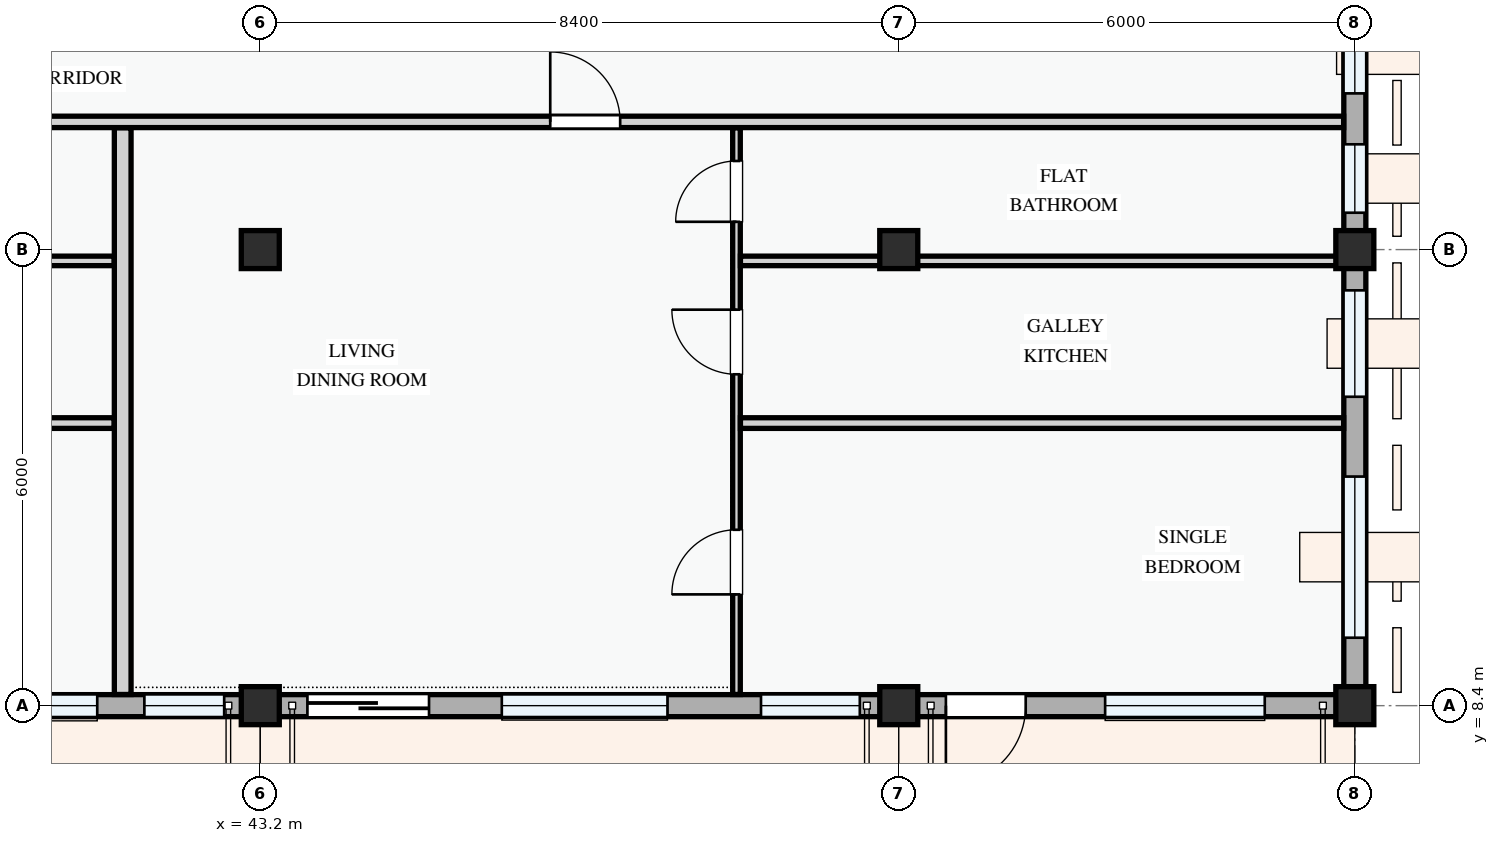
"""IFC4 building model, lengths in metres.
Left out: names, types, materials, properties, quantities, classifications, styles, units other than length and angle.
Written with IfcOpenShell. Run it as: python <this file> out.ifc"""

import sys

from ifc_helpers import new_model, si_unit, direction, frame, frame_2d, origin, origin_2d, place, context, subcontext, project, spatial, rectangle, extrude, element, fill, save


model = new_model("IFC4")
c1 = context("Model", 3, precision=1e-05, world=origin(), true_north=direction((0.0, 1.0)))
c2 = subcontext(c1, "Body", "Model", "MODEL_VIEW")
j1 = project(units=[si_unit("LENGTHUNIT", "METRE"), si_unit("PLANEANGLEUNIT", "RADIAN")], contexts=[c1])
p1 = place(None, origin())
s1 = spatial("IfcSite", under=j1, at=p1, CompositionType="ELEMENT")
p2 = place(p1, origin())
s2 = spatial("IfcBuilding", under=s1, at=p2, CompositionType="ELEMENT")
p3 = place(p2, frame((0.0, 0.0, 21.3)))
s3 = spatial("IfcBuildingStorey", under=s2, at=p3, CompositionType="ELEMENT", Elevation=21.3)
for number, where, z_axis, x_axis in (
    (1, (43.2, 8.4, 0.0), (0.0, 0.0, 1.0), (1.0, 0.0, 0.0)),
    (2, (43.2, 14.4, 0.0), (0.0, 0.0, 1.0), (1.0, 0.0, 0.0)),
    (3, (51.6, 8.4, 0.0), (0.0, 0.0, 1.0), (1.0, 0.0, 0.0)),
    (4, (51.6, 14.4, 0.0), (0.0, 0.0, 1.0), (1.0, 0.0, 0.0)),
    (5, (57.6, 8.4, 0.0), (0.0, 0.0, 1.0), (1.0, 0.0, 0.0)),
    (6, (57.6, 14.4, 0.0), (0.0, 0.0, 1.0), (1.0, 0.0, 0.0)),
):
    element("IfcColumn", number, at=place(p3, frame(where, z_axis=z_axis, x_axis=x_axis)), inside=s3, PredefinedType="COLUMN", context=c2, shape_type="SweptSolid", body=[
        extrude(rectangle(XDim=0.5, YDim=0.5, at=origin_2d()), origin(), (0.0, 0.0, 1.0), 3.3),
    ])
p4 = place(p3, frame((37.2, 8.4, 0.0), z_axis=(0.0, 0.0, 1.0), x_axis=(1.0, 0.0, 0.0)))
e7 = element("IfcWall", 7, at=p4, inside=s3, PredefinedType="STANDARD", context=c2, shape_type="SweptSolid", body=[
    extrude(rectangle(XDim=6.0, YDim=0.29, at=frame_2d((3.0, 0.0))), origin(), (0.0, 0.0, 1.0), 2.475),
])
p5 = place(p4, frame((0.62, 0.0, 0.0)))
e8 = element("IfcOpeningElement", 8, at=p5, cuts=e7, PredefinedType="OPENING", context=c2, shape_type="SweptSolid", body=[
    extrude(rectangle(XDim=1.5, YDim=2.2, at=frame_2d((0.75, 1.1))), frame((0.0, 0.155, 0.0), z_axis=(0.0, -1.0, 0.0), x_axis=(1.0, 0.0, 0.0)), (0.0, 0.0, 1.0), 0.31),
])
p6 = place(p4, frame((2.505, 0.0, 0.78)))
e9 = element("IfcOpeningElement", 9, at=p6, cuts=e7, PredefinedType="OPENING", context=c2, shape_type="SweptSolid", body=[
    extrude(rectangle(XDim=1.35, YDim=1.55, at=frame_2d((0.675, 0.775))), frame((0.0, 0.155, 0.0), z_axis=(0.0, -1.0, 0.0), x_axis=(1.0, 0.0, 0.0)), (0.0, 0.0, 1.0), 0.31),
])
p7 = place(p4, frame((4.475, 0.0, 0.78)))
e10 = element("IfcOpeningElement", 10, at=p7, cuts=e7, PredefinedType="OPENING", context=c2, shape_type="SweptSolid", body=[
    extrude(rectangle(XDim=1.05, YDim=1.2, at=frame_2d((0.525, 0.6))), frame((0.0, 0.155, 0.0), z_axis=(0.0, -1.0, 0.0), x_axis=(1.0, 0.0, 0.0)), (0.0, 0.0, 1.0), 0.31),
])
p8 = place(p3, frame((43.2, 8.4, 0.0), z_axis=(0.0, 0.0, 1.0), x_axis=(1.0, 0.0, 0.0)))
e11 = element("IfcWall", 11, at=p8, inside=s3, PredefinedType="STANDARD", context=c2, shape_type="SweptSolid", body=[
    extrude(rectangle(XDim=8.4, YDim=0.29, at=frame_2d((4.2, 0.0))), origin(), (0.0, 0.0, 1.0), 2.375),
])
p9 = place(p8, frame((0.62, 0.0, 0.0)))
e12 = element("IfcOpeningElement", 12, at=p9, cuts=e11, PredefinedType="OPENING", context=c2, shape_type="SweptSolid", body=[
    extrude(rectangle(XDim=1.6, YDim=2.2, at=frame_2d((0.8, 1.1))), frame((0.0, 0.155, 0.0), z_axis=(0.0, -1.0, 0.0), x_axis=(1.0, 0.0, 0.0)), (0.0, 0.0, 1.0), 0.31),
])
p10 = place(p8, frame((3.177, 0.0, 0.78)))
e13 = element("IfcOpeningElement", 13, at=p10, cuts=e11, PredefinedType="OPENING", context=c2, shape_type="SweptSolid", body=[
    extrude(rectangle(XDim=2.18, YDim=1.48, at=frame_2d((1.09, 0.74))), frame((0.0, 0.155, 0.0), z_axis=(0.0, -1.0, 0.0), x_axis=(1.0, 0.0, 0.0)), (0.0, 0.0, 1.0), 0.31),
])
p11 = place(p8, frame((6.587, 0.0, 0.78)))
e14 = element("IfcOpeningElement", 14, at=p11, cuts=e11, PredefinedType="OPENING", context=c2, shape_type="SweptSolid", body=[
    extrude(rectangle(XDim=1.3, YDim=1.4, at=frame_2d((0.65, 0.7))), frame((0.0, 0.155, 0.0), z_axis=(0.0, -1.0, 0.0), x_axis=(1.0, 0.0, 0.0)), (0.0, 0.0, 1.0), 0.31),
])
p12 = place(p3, frame((51.6, 8.4, 0.0), z_axis=(0.0, 0.0, 1.0), x_axis=(1.0, 0.0, 0.0)))
e15 = element("IfcWall", 15, at=p12, inside=s3, PredefinedType="STANDARD", context=c2, shape_type="SweptSolid", body=[
    extrude(rectangle(XDim=6.0, YDim=0.29, at=frame_2d((3.0, 0.0))), origin(), (0.0, 0.0, 1.0), 2.475),
])
p13 = place(p12, frame((0.62, 0.0, 0.0)))
e16 = element("IfcOpeningElement", 16, at=p13, cuts=e15, PredefinedType="OPENING", context=c2, shape_type="SweptSolid", body=[
    extrude(rectangle(XDim=1.05, YDim=2.15, at=frame_2d((0.525, 1.075))), frame((0.0, 0.155, 0.0), z_axis=(0.0, -1.0, 0.0), x_axis=(1.0, 0.0, 0.0)), (0.0, 0.0, 1.0), 0.31),
])
p14 = place(p12, frame((2.715, 0.0, 0.78)))
e17 = element("IfcOpeningElement", 17, at=p14, cuts=e15, PredefinedType="OPENING", context=c2, shape_type="SweptSolid", body=[
    extrude(rectangle(XDim=2.1, YDim=1.55, at=frame_2d((1.05, 0.775))), frame((0.0, 0.155, 0.0), z_axis=(0.0, -1.0, 0.0), x_axis=(1.0, 0.0, 0.0)), (0.0, 0.0, 1.0), 0.31),
])
p15 = place(p3, frame((57.6, 8.4, 0.0), z_axis=(0.0, 0.0, 1.0), x_axis=(0.0, 1.0, 0.0)))
e18 = element("IfcWall", 18, at=p15, inside=s3, PredefinedType="STANDARD", context=c2, shape_type="SweptSolid", body=[
    extrude(rectangle(XDim=6.0, YDim=0.29, at=frame_2d((3.0, 0.0))), origin(), (0.0, 0.0, 1.0), 2.575),
])
p16 = place(p15, frame((0.894, 0.0, 0.78)))
e19 = element("IfcOpeningElement", 19, at=p16, cuts=e18, PredefinedType="OPENING", context=c2, shape_type="SweptSolid", body=[
    extrude(rectangle(XDim=2.12, YDim=1.44, at=frame_2d((1.06, 0.72))), frame((0.0, 0.155, 0.0), z_axis=(0.0, -1.0, 0.0), x_axis=(1.0, 0.0, 0.0)), (0.0, 0.0, 1.0), 0.31),
])
p17 = place(p15, frame((4.064, 0.0, 0.78)))
e20 = element("IfcOpeningElement", 20, at=p17, cuts=e18, PredefinedType="OPENING", context=c2, shape_type="SweptSolid", body=[
    extrude(rectangle(XDim=1.4, YDim=1.45, at=frame_2d((0.7, 0.725))), frame((0.0, 0.155, 0.0), z_axis=(0.0, -1.0, 0.0), x_axis=(1.0, 0.0, 0.0)), (0.0, 0.0, 1.0), 0.31),
])
p18 = place(p3, frame((57.6, 14.4, 0.0), z_axis=(0.0, 0.0, 1.0), x_axis=(0.0, 1.0, 0.0)))
e21 = element("IfcWall", 21, at=p18, inside=s3, PredefinedType="STANDARD", context=c2, shape_type="SweptSolid", body=[
    extrude(rectangle(XDim=8.4, YDim=0.29, at=frame_2d((4.2, 0.0))), origin(), (0.0, 0.0, 1.0), 2.425),
])
p19 = place(p18, frame((0.485, 0.0, 0.78)))
e22 = element("IfcOpeningElement", 22, at=p19, cuts=e21, PredefinedType="OPENING", context=c2, shape_type="SweptSolid", body=[
    extrude(rectangle(XDim=0.9, YDim=1.2, at=frame_2d((0.45, 0.6))), frame((0.0, 0.155, 0.0), z_axis=(0.0, -1.0, 0.0), x_axis=(1.0, 0.0, 0.0)), (0.0, 0.0, 1.0), 0.31),
])
p20 = place(p18, frame((2.055, 0.0, 0.78)))
e23 = element("IfcOpeningElement", 23, at=p20, cuts=e21, PredefinedType="OPENING", context=c2, shape_type="SweptSolid", body=[
    extrude(rectangle(XDim=1.15, YDim=1.25, at=frame_2d((0.575, 0.625))), frame((0.0, 0.155, 0.0), z_axis=(0.0, -1.0, 0.0), x_axis=(1.0, 0.0, 0.0)), (0.0, 0.0, 1.0), 0.31),
])
p21 = place(p18, frame((6.633, 0.0, 0.78)))
e24 = element("IfcOpeningElement", 24, at=p21, cuts=e21, PredefinedType="OPENING", context=c2, shape_type="SweptSolid", body=[
    extrude(rectangle(XDim=1.0, YDim=1.25, at=frame_2d((0.5, 0.625))), frame((0.0, 0.155, 0.0), z_axis=(0.0, -1.0, 0.0), x_axis=(1.0, 0.0, 0.0)), (0.0, 0.0, 1.0), 0.31),
])
p22 = place(p3, frame((35.462, 12.118, 0.0), z_axis=(0.0, 0.0, 1.0), x_axis=(1.0, 0.0, 0.0)))
e25 = element("IfcWall", 25, at=p22, inside=s3, PredefinedType="PARTITIONING", context=c2, shape_type="SweptSolid", body=[
    extrude(rectangle(XDim=5.816, YDim=0.14, at=frame_2d((2.908, 0.0))), origin(), (0.0, 0.0, 1.0), 3.0),
])
p23 = place(p3, frame((35.462, 14.251, 0.0), z_axis=(0.0, 0.0, 1.0), x_axis=(1.0, 0.0, 0.0)))
e26 = element("IfcWall", 26, at=p23, inside=s3, PredefinedType="PARTITIONING", context=c2, shape_type="SweptSolid", body=[
    extrude(rectangle(XDim=5.816, YDim=0.125, at=frame_2d((2.908, 0.0))), origin(), (0.0, 0.0, 1.0), 2.375),
])
p24 = place(p3, frame((49.465, 8.547, 0.0), z_axis=(0.0, 0.0, 1.0), x_axis=(0.0, 1.0, 0.0)))
e27 = element("IfcWall", 27, at=p24, inside=s3, PredefinedType="PARTITIONING", context=c2, shape_type="SweptSolid", body=[
    extrude(rectangle(XDim=7.456, YDim=0.1, at=frame_2d((3.728, 0.0))), origin(), (0.0, 0.0, 1.0), 3.0),
])
p25 = place(p24, frame((1.317, 0.0, 0.0)))
e28 = element("IfcOpeningElement", 28, at=p25, cuts=e27, PredefinedType="OPENING", context=c2, shape_type="SweptSolid", body=[
    extrude(rectangle(XDim=0.85, YDim=2.1, at=frame_2d((0.425, 1.05))), frame((0.0, 0.06, 0.0), z_axis=(0.0, -1.0, 0.0), x_axis=(1.0, 0.0, 0.0)), (0.0, 0.0, 1.0), 0.12),
])
p26 = place(p24, frame((4.212, 0.0, 0.0)))
e29 = element("IfcOpeningElement", 29, at=p26, cuts=e27, PredefinedType="OPENING", context=c2, shape_type="SweptSolid", body=[
    extrude(rectangle(XDim=0.85, YDim=2.1, at=frame_2d((0.425, 1.05))), frame((0.0, 0.06, 0.0), z_axis=(0.0, -1.0, 0.0), x_axis=(1.0, 0.0, 0.0)), (0.0, 0.0, 1.0), 0.12),
])
p27 = place(p24, frame((6.219, 0.0, 0.0)))
e30 = element("IfcOpeningElement", 30, at=p27, cuts=e27, PredefinedType="OPENING", context=c2, shape_type="SweptSolid", body=[
    extrude(rectangle(XDim=0.8, YDim=2.1, at=frame_2d((0.4, 1.05))), frame((0.0, 0.06, 0.0), z_axis=(0.0, -1.0, 0.0), x_axis=(1.0, 0.0, 0.0)), (0.0, 0.0, 1.0), 0.12),
])
p28 = place(p3, frame((49.517, 12.118, 0.0), z_axis=(0.0, 0.0, 1.0), x_axis=(1.0, 0.0, 0.0)))
e31 = element("IfcWall", 31, at=p28, inside=s3, PredefinedType="PARTITIONING", context=c2, shape_type="SweptSolid", body=[
    extrude(rectangle(XDim=7.936, YDim=0.14, at=frame_2d((3.968, 0.0))), origin(), (0.0, 0.0, 1.0), 3.0),
])
p29 = place(p3, frame((49.517, 14.251, 0.0), z_axis=(0.0, 0.0, 1.0), x_axis=(1.0, 0.0, 0.0)))
e32 = element("IfcWall", 32, at=p29, inside=s3, PredefinedType="PARTITIONING", context=c2, shape_type="SweptSolid", body=[
    extrude(rectangle(XDim=7.936, YDim=0.125, at=frame_2d((3.968, 0.0))), origin(), (0.0, 0.0, 1.0), 2.375),
])
p30 = place(p3, frame((41.39, 8.547, 0.0), z_axis=(0.0, 0.0, 1.0), x_axis=(0.0, 1.0, 0.0)))
e33 = element("IfcWall", 33, at=p30, inside=s3, PredefinedType="PARTITIONING", context=c2, shape_type="SweptSolid", body=[
    extrude(rectangle(XDim=7.456, YDim=0.22, at=frame_2d((3.728, 0.0))), origin(), (0.0, 0.0, 1.0), 3.0),
])
p31 = place(p3, frame((22.66, 16.08, 0.0), z_axis=(0.0, 0.0, 1.0), x_axis=(1.0, 0.0, 0.0)))
e34 = element("IfcWall", 34, at=p31, inside=s3, PredefinedType="PARTITIONING", context=c2, shape_type="SweptSolid", body=[
    extrude(rectangle(XDim=34.793, YDim=0.15, at=frame_2d((17.396, 0.0))), origin(), (0.0, 0.0, 1.0), 3.0),
])
p32 = place(p31, frame((2.627, 0.0, 0.0)))
e35 = element("IfcOpeningElement", 35, at=p32, cuts=e34, PredefinedType="OPENING", context=c2, shape_type="SweptSolid", body=[
    extrude(rectangle(XDim=0.92, YDim=2.1, at=frame_2d((0.46, 1.05))), frame((0.0, 0.085, 0.0), z_axis=(0.0, -1.0, 0.0), x_axis=(1.0, 0.0, 0.0)), (0.0, 0.0, 1.0), 0.17),
])
p33 = place(p31, frame((10.02, 0.0, 0.0)))
e36 = element("IfcOpeningElement", 36, at=p33, cuts=e34, PredefinedType="OPENING", context=c2, shape_type="SweptSolid", body=[
    extrude(rectangle(XDim=0.92, YDim=2.1, at=frame_2d((0.46, 1.05))), frame((0.0, 0.085, 0.0), z_axis=(0.0, -1.0, 0.0), x_axis=(1.0, 0.0, 0.0)), (0.0, 0.0, 1.0), 0.17),
])
p34 = place(p31, frame((24.355, 0.0, 0.0)))
e37 = element("IfcOpeningElement", 37, at=p34, cuts=e34, PredefinedType="OPENING", context=c2, shape_type="SweptSolid", body=[
    extrude(rectangle(XDim=0.92, YDim=2.1, at=frame_2d((0.46, 1.05))), frame((0.0, 0.085, 0.0), z_axis=(0.0, -1.0, 0.0), x_axis=(1.0, 0.0, 0.0)), (0.0, 0.0, 1.0), 0.17),
])
p35 = place(p6, origin())
e38 = element("IfcWindow", 38, at=p35, inside=s3, PartitioningType="SINGLE_PANEL", PredefinedType="WINDOW", context=c2, shape_type="SweptSolid", body=[
    extrude(rectangle(XDim=1.35, YDim=1.55, at=frame_2d((0.675, 0.775))), frame((0.0, 0.03, 0.0), z_axis=(0.0, -1.0, 0.0), x_axis=(1.0, 0.0, 0.0)), (0.0, 0.0, 1.0), 0.06),
])
fill(e9, e38)
p36 = place(p7, origin())
e39 = element("IfcWindow", 39, at=p36, inside=s3, PartitioningType="SINGLE_PANEL", PredefinedType="WINDOW", context=c2, shape_type="SweptSolid", body=[
    extrude(rectangle(XDim=1.05, YDim=1.2, at=frame_2d((0.525, 0.6))), frame((0.0, 0.03, 0.0), z_axis=(0.0, -1.0, 0.0), x_axis=(1.0, 0.0, 0.0)), (0.0, 0.0, 1.0), 0.06),
])
fill(e10, e39)
p37 = place(p9, frame((1.6, 0.0, 0.0), z_axis=(0.0, 0.0, 1.0), x_axis=(-1.0, 0.0, 0.0)))
e40 = element("IfcDoor", 40, at=p37, inside=s3, OperationType="SLIDING_TO_LEFT", PredefinedType="DOOR", context=c2, shape_type="SweptSolid", body=[
    extrude(rectangle(XDim=1.6, YDim=2.2, at=frame_2d((0.8, 1.1))), frame((0.0, 0.025, 0.0), z_axis=(0.0, -1.0, 0.0), x_axis=(1.0, 0.0, 0.0)), (0.0, 0.0, 1.0), 0.05),
])
fill(e12, e40)
p38 = place(p10, origin())
e41 = element("IfcWindow", 41, at=p38, inside=s3, PartitioningType="DOUBLE_PANEL_VERTICAL", PredefinedType="WINDOW", context=c2, shape_type="SweptSolid", body=[
    extrude(rectangle(XDim=2.18, YDim=1.48, at=frame_2d((1.09, 0.74))), frame((0.0, 0.03, 0.0), z_axis=(0.0, -1.0, 0.0), x_axis=(1.0, 0.0, 0.0)), (0.0, 0.0, 1.0), 0.06),
])
fill(e13, e41)
p39 = place(p11, origin())
e42 = element("IfcWindow", 42, at=p39, inside=s3, PartitioningType="SINGLE_PANEL", PredefinedType="WINDOW", context=c2, shape_type="SweptSolid", body=[
    extrude(rectangle(XDim=1.3, YDim=1.4, at=frame_2d((0.65, 0.7))), frame((0.0, 0.03, 0.0), z_axis=(0.0, -1.0, 0.0), x_axis=(1.0, 0.0, 0.0)), (0.0, 0.0, 1.0), 0.06),
])
fill(e14, e42)
p40 = place(p13, frame((1.05, 0.0, 0.0), z_axis=(0.0, 0.0, 1.0), x_axis=(-1.0, 0.0, 0.0)))
e43 = element("IfcDoor", 43, at=p40, inside=s3, OperationType="SINGLE_SWING_RIGHT", PredefinedType="DOOR", context=c2, shape_type="SweptSolid", body=[
    extrude(rectangle(XDim=1.05, YDim=2.15, at=frame_2d((0.525, 1.075))), frame((0.0, 0.025, 0.0), z_axis=(0.0, -1.0, 0.0), x_axis=(1.0, 0.0, 0.0)), (0.0, 0.0, 1.0), 0.05),
])
fill(e16, e43)
p41 = place(p14, origin())
e44 = element("IfcWindow", 44, at=p41, inside=s3, PartitioningType="DOUBLE_PANEL_VERTICAL", PredefinedType="WINDOW", context=c2, shape_type="SweptSolid", body=[
    extrude(rectangle(XDim=2.1, YDim=1.55, at=frame_2d((1.05, 0.775))), frame((0.0, 0.03, 0.0), z_axis=(0.0, -1.0, 0.0), x_axis=(1.0, 0.0, 0.0)), (0.0, 0.0, 1.0), 0.06),
])
fill(e17, e44)
p42 = place(p16, origin())
e45 = element("IfcWindow", 45, at=p42, inside=s3, PartitioningType="DOUBLE_PANEL_VERTICAL", PredefinedType="WINDOW", context=c2, shape_type="SweptSolid", body=[
    extrude(rectangle(XDim=2.12, YDim=1.44, at=frame_2d((1.06, 0.72))), frame((0.0, 0.03, 0.0), z_axis=(0.0, -1.0, 0.0), x_axis=(1.0, 0.0, 0.0)), (0.0, 0.0, 1.0), 0.06),
])
fill(e19, e45)
p43 = place(p17, origin())
e46 = element("IfcWindow", 46, at=p43, inside=s3, PartitioningType="SINGLE_PANEL", PredefinedType="WINDOW", context=c2, shape_type="SweptSolid", body=[
    extrude(rectangle(XDim=1.4, YDim=1.45, at=frame_2d((0.7, 0.725))), frame((0.0, 0.03, 0.0), z_axis=(0.0, -1.0, 0.0), x_axis=(1.0, 0.0, 0.0)), (0.0, 0.0, 1.0), 0.06),
])
fill(e20, e46)
p44 = place(p19, origin())
e47 = element("IfcWindow", 47, at=p44, inside=s3, PartitioningType="SINGLE_PANEL", PredefinedType="WINDOW", context=c2, shape_type="SweptSolid", body=[
    extrude(rectangle(XDim=0.9, YDim=1.2, at=frame_2d((0.45, 0.6))), frame((0.0, 0.03, 0.0), z_axis=(0.0, -1.0, 0.0), x_axis=(1.0, 0.0, 0.0)), (0.0, 0.0, 1.0), 0.06),
])
fill(e22, e47)
p45 = place(p20, origin())
e48 = element("IfcWindow", 48, at=p45, inside=s3, PartitioningType="SINGLE_PANEL", PredefinedType="WINDOW", context=c2, shape_type="SweptSolid", body=[
    extrude(rectangle(XDim=1.15, YDim=1.25, at=frame_2d((0.575, 0.625))), frame((0.0, 0.03, 0.0), z_axis=(0.0, -1.0, 0.0), x_axis=(1.0, 0.0, 0.0)), (0.0, 0.0, 1.0), 0.06),
])
fill(e23, e48)
p46 = place(p25, origin())
e49 = element("IfcDoor", 49, at=p46, inside=s3, OperationType="SINGLE_SWING_LEFT", PredefinedType="DOOR", context=c2, shape_type="SweptSolid", body=[
    extrude(rectangle(XDim=0.85, YDim=2.1, at=frame_2d((0.425, 1.05))), frame((0.0, 0.025, 0.0), z_axis=(0.0, -1.0, 0.0), x_axis=(1.0, 0.0, 0.0)), (0.0, 0.0, 1.0), 0.05),
])
fill(e28, e49)
p47 = place(p26, origin())
e50 = element("IfcDoor", 50, at=p47, inside=s3, OperationType="SINGLE_SWING_RIGHT", PredefinedType="DOOR", context=c2, shape_type="SweptSolid", body=[
    extrude(rectangle(XDim=0.85, YDim=2.1, at=frame_2d((0.425, 1.05))), frame((0.0, 0.025, 0.0), z_axis=(0.0, -1.0, 0.0), x_axis=(1.0, 0.0, 0.0)), (0.0, 0.0, 1.0), 0.05),
])
fill(e29, e50)
p48 = place(p27, origin())
e51 = element("IfcDoor", 51, at=p48, inside=s3, OperationType="SINGLE_SWING_LEFT", PredefinedType="DOOR", context=c2, shape_type="SweptSolid", body=[
    extrude(rectangle(XDim=0.8, YDim=2.1, at=frame_2d((0.4, 1.05))), frame((0.0, 0.025, 0.0), z_axis=(0.0, -1.0, 0.0), x_axis=(1.0, 0.0, 0.0)), (0.0, 0.0, 1.0), 0.05),
])
fill(e30, e51)
p49 = place(p34, origin())
e52 = element("IfcDoor", 52, at=p49, inside=s3, OperationType="SINGLE_SWING_LEFT", PredefinedType="DOOR", context=c2, shape_type="SweptSolid", body=[
    extrude(rectangle(XDim=0.92, YDim=2.1, at=frame_2d((0.46, 1.05))), frame((0.0, 0.025, 0.0), z_axis=(0.0, -1.0, 0.0), x_axis=(1.0, 0.0, 0.0)), (0.0, 0.0, 1.0), 0.05),
])
fill(e37, e52)
save(model, sys.argv[1])
